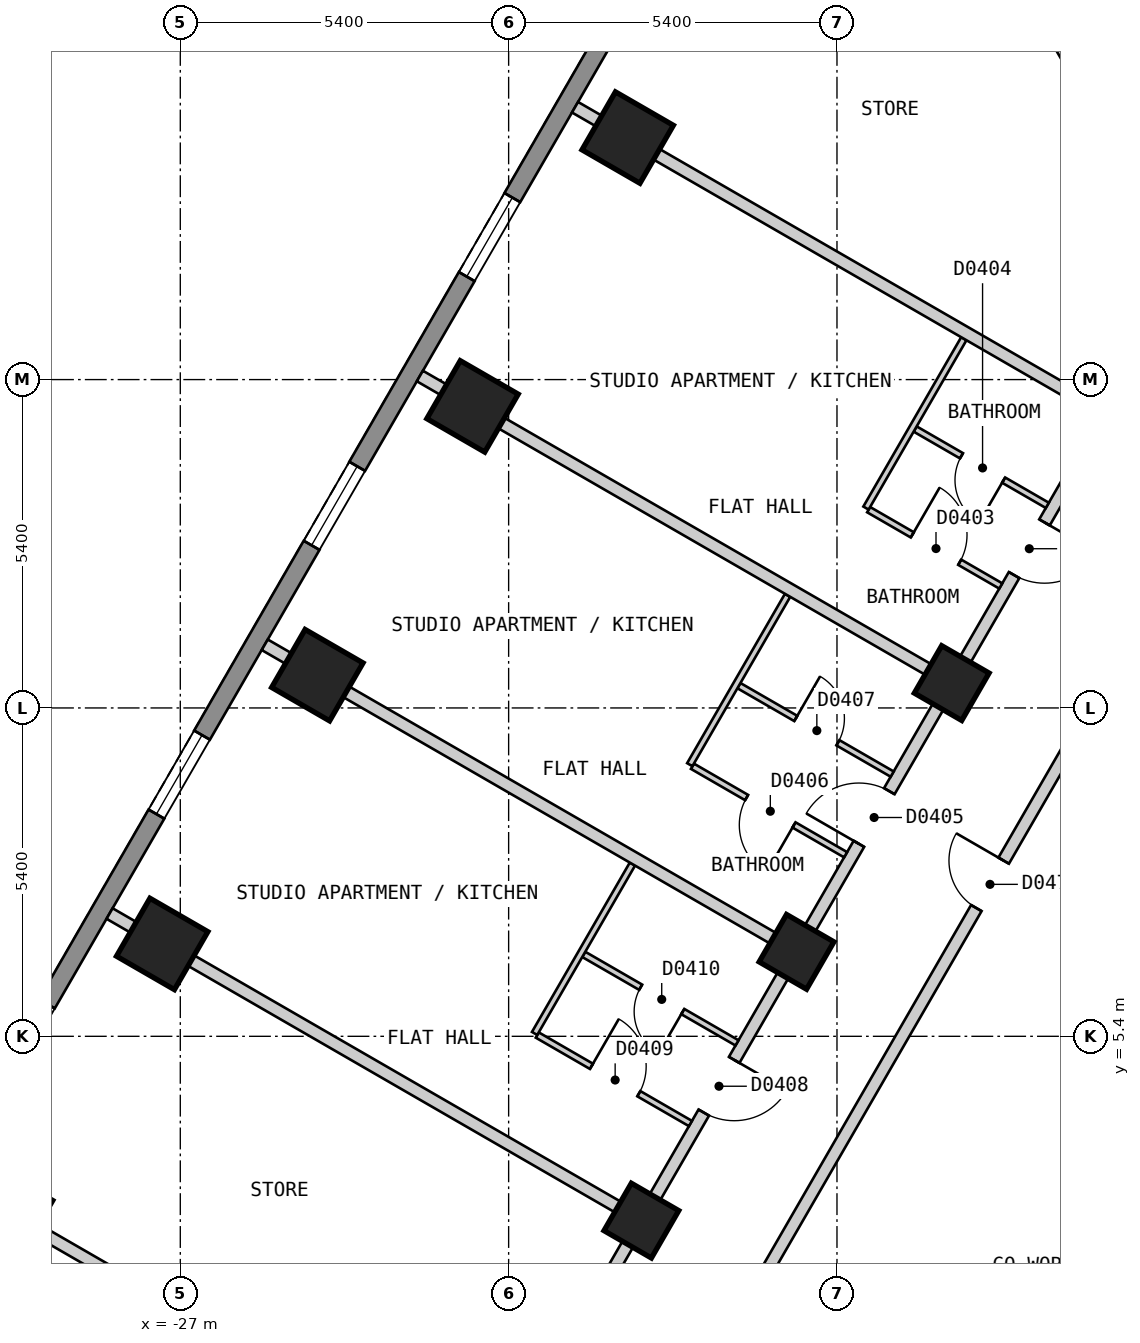
"""IFC4 building model, lengths in metres.
Left out: names, types, materials, properties, quantities, classifications, styles, units other than length and angle.
Written with IfcOpenShell. Run it as: python <this file> out.ifc"""

import sys

from ifc_helpers import new_model, si_unit, direction, frame, frame_2d, origin, origin_2d, place, context, subcontext, project, spatial, polyline, rectangle, outline, extrude, element, fill, save


model = new_model("IFC4")
c1 = context("Model", 3, precision=1e-05, world=origin(), true_north=direction((0.0, 1.0)))
c2 = subcontext(c1, "Body", "Model", "MODEL_VIEW")
j1 = project(units=[si_unit("LENGTHUNIT", "METRE"), si_unit("PLANEANGLEUNIT", "RADIAN")], contexts=[c1])
p1 = place(None, origin())
s1 = spatial("IfcSite", under=j1, at=p1, CompositionType="ELEMENT")
p2 = place(p1, origin())
s2 = spatial("IfcBuilding", under=s1, at=p2, CompositionType="ELEMENT")
p3 = place(p2, frame((0.0, 0.0, 26.4)))
s3 = spatial("IfcBuildingStorey", under=s2, at=p3, CompositionType="ELEMENT", Elevation=26.4)
for number, where, z_axis, x_axis in (
    (1, (-19.642, 20.18, 0.0), (0.0, 0.0, 1.0), (-0.5, -0.866, 0.0)),
    (2, (-22.194, 15.759, 0.0), (0.0, 0.0, 1.0), (-0.5, -0.866, 0.0)),
    (3, (-24.746, 11.339, 0.0), (0.0, 0.0, 1.0), (-0.5, -0.866, 0.0)),
    (4, (-27.298, 6.919, 0.0), (0.0, 0.0, 1.0), (-0.5, -0.866, 0.0)),
    (5, (-29.849, 2.499, 0.0), (0.0, 0.0, 1.0), (-0.5, -0.866, 0.0)),
):
    element("IfcColumn", number, at=place(p3, frame(where, z_axis=z_axis, x_axis=x_axis)), inside=s3, PredefinedType="COLUMN", context=c2, shape_type="SweptSolid", body=[
        extrude(rectangle(XDim=1.1, YDim=1.1, at=origin_2d()), origin(), (0.0, 0.0, 1.0), 3.0),
    ])
for number, where, z_axis, x_axis in (
    (6, (-14.313, 11.209, 0.0), (0.0, 0.0, 1.0), (-0.5, -0.866, 0.0)),
    (7, (-16.865, 6.789, 0.0), (0.0, 0.0, 1.0), (-0.5, -0.866, 0.0)),
    (8, (-19.417, 2.369, 0.0), (0.0, 0.0, 1.0), (-0.5, -0.866, 0.0)),
):
    element("IfcColumn", number, at=place(p3, frame(where, z_axis=z_axis, x_axis=x_axis)), inside=s3, PredefinedType="COLUMN", context=c2, shape_type="SweptSolid", body=[
        extrude(rectangle(XDim=0.9, YDim=0.9, at=origin_2d()), origin(), (0.0, 0.0, 1.0), 3.0),
    ])
p4 = place(p3, frame((-17.71, 25.825, 0.0), z_axis=(0.0, 0.0, 1.0), x_axis=(-0.500001938803, -0.866024284413, 0.0)))
e9 = element("IfcWall", 9, at=p4, inside=s3, PredefinedType="SOLIDWALL", context=c2, shape_type="SweptSolid", body=[
    extrude(outline(polyline([(0.0, -0.15), (27.02, -0.15), (26.94, 0.15), (0.08, 0.15), (0.0, -0.15)])), origin(), (0.0, 0.0, 1.0), 2.7),
])
p5 = place(p4, frame((2.553, 0.0, 0.15)))
e10 = element("IfcOpeningElement", 10, at=p5, cuts=e9, PredefinedType="OPENING", context=c2, shape_type="SweptSolid", body=[
    extrude(rectangle(XDim=1.5, YDim=2.1, at=frame_2d((0.75, 1.05))), frame((0.0, 0.16, 0.0), z_axis=(0.0, -1.0, 0.0), x_axis=(1.0, 0.0, 0.0)), (0.0, 0.0, 1.0), 0.32),
])
p6 = place(p4, frame((7.658, 0.0, 0.15)))
e11 = element("IfcOpeningElement", 11, at=p6, cuts=e9, PredefinedType="OPENING", context=c2, shape_type="SweptSolid", body=[
    extrude(rectangle(XDim=1.5, YDim=2.1, at=frame_2d((0.75, 1.05))), frame((0.0, 0.16, 0.0), z_axis=(0.0, -1.0, 0.0), x_axis=(1.0, 0.0, 0.0)), (0.0, 0.0, 1.0), 0.32),
])
p7 = place(p4, frame((12.761, 0.0, 0.15)))
e12 = element("IfcOpeningElement", 12, at=p7, cuts=e9, PredefinedType="OPENING", context=c2, shape_type="SweptSolid", body=[
    extrude(rectangle(XDim=1.5, YDim=2.1, at=frame_2d((0.75, 1.05))), frame((0.0, 0.16, 0.0), z_axis=(0.0, -1.0, 0.0), x_axis=(1.0, 0.0, 0.0)), (0.0, 0.0, 1.0), 0.32),
])
p8 = place(p4, frame((17.865, 0.0, 0.15)))
e13 = element("IfcOpeningElement", 13, at=p8, cuts=e9, PredefinedType="OPENING", context=c2, shape_type="SweptSolid", body=[
    extrude(rectangle(XDim=1.5, YDim=2.1, at=frame_2d((0.75, 1.05))), frame((0.0, 0.16, 0.0), z_axis=(0.0, -1.0, 0.0), x_axis=(1.0, 0.0, 0.0)), (0.0, 0.0, 1.0), 0.32),
])
p9 = place(p4, frame((22.969, 0.0, 0.15)))
e14 = element("IfcOpeningElement", 14, at=p9, cuts=e9, PredefinedType="OPENING", context=c2, shape_type="SweptSolid", body=[
    extrude(rectangle(XDim=1.5, YDim=2.1, at=frame_2d((0.75, 1.05))), frame((0.0, 0.16, 0.0), z_axis=(0.0, -1.0, 0.0), x_axis=(1.0, 0.0, 0.0)), (0.0, 0.0, 1.0), 0.32),
])
p10 = place(p3, frame((-18.244, -0.001, 0.0), z_axis=(0.0, 0.0, 1.0), x_axis=(0.499962999376, 0.866046765051, 0.0)))
e15 = element("IfcWall", 15, at=p10, inside=s3, PredefinedType="PARTITIONING", context=c2, shape_type="SweptSolid", body=[
    extrude(rectangle(XDim=18.245, YDim=0.2, at=frame_2d((9.123, 0.0))), origin(), (0.0, 0.0, 1.0), 2.7),
])
p11 = place(p10, frame((8.672, 0.0, 0.0)))
e16 = element("IfcOpeningElement", 16, at=p11, cuts=e15, PredefinedType="OPENING", context=c2, shape_type="SweptSolid", body=[
    extrude(rectangle(XDim=0.9, YDim=2.1, at=frame_2d((0.45, 1.05))), frame((0.0, 0.11, 0.0), z_axis=(0.0, -1.0, 0.0), x_axis=(1.0, 0.0, 0.0)), (0.0, 0.0, 1.0), 0.22),
])
p12 = place(p3, frame((-20.727, 0.099, 0.0), z_axis=(0.0, 0.0, 1.0), x_axis=(0.499993204491, 0.866029327138, 0.0)))
e17 = element("IfcWall", 17, at=p12, inside=s3, PredefinedType="PARTITIONING", context=c2, shape_type="SweptSolid", body=[
    extrude(rectangle(XDim=20.554, YDim=0.2, at=frame_2d((10.277, 0.0))), origin(), (0.0, 0.0, 1.0), 2.7),
])
p13 = place(p12, frame((18.916, 0.0, 0.0)))
e18 = element("IfcOpeningElement", 18, at=p13, cuts=e17, PredefinedType="OPENING", context=c2, shape_type="SweptSolid", body=[
    extrude(rectangle(XDim=0.8, YDim=2.1, at=frame_2d((0.4, 1.05))), frame((0.0, 0.11, 0.0), z_axis=(0.0, -1.0, 0.0), x_axis=(1.0, 0.0, 0.0)), (0.0, 0.0, 1.0), 0.22),
])
p14 = place(p12, frame((14.88, 0.0, 0.0)))
e19 = element("IfcOpeningElement", 19, at=p14, cuts=e17, PredefinedType="OPENING", context=c2, shape_type="SweptSolid", body=[
    extrude(rectangle(XDim=1.0, YDim=2.1, at=frame_2d((0.5, 1.05))), frame((0.0, 0.11, 0.0), z_axis=(0.0, -1.0, 0.0), x_axis=(1.0, 0.0, 0.0)), (0.0, 0.0, 1.0), 0.22),
])
p15 = place(p12, frame((9.776, 0.0, 0.0)))
e20 = element("IfcOpeningElement", 20, at=p15, cuts=e17, PredefinedType="OPENING", context=c2, shape_type="SweptSolid", body=[
    extrude(rectangle(XDim=1.0, YDim=2.1, at=frame_2d((0.5, 1.05))), frame((0.0, 0.11, 0.0), z_axis=(0.0, -1.0, 0.0), x_axis=(1.0, 0.0, 0.0)), (0.0, 0.0, 1.0), 0.22),
])
p16 = place(p12, frame((4.673, 0.0, 0.0)))
e21 = element("IfcOpeningElement", 21, at=p16, cuts=e17, PredefinedType="OPENING", context=c2, shape_type="SweptSolid", body=[
    extrude(rectangle(XDim=1.0, YDim=2.1, at=frame_2d((0.5, 1.05))), frame((0.0, 0.11, 0.0), z_axis=(0.0, -1.0, 0.0), x_axis=(1.0, 0.0, 0.0)), (0.0, 0.0, 1.0), 0.22),
])
p17 = place(p12, frame((0.838, 0.0, 0.0)))
e22 = element("IfcOpeningElement", 22, at=p17, cuts=e17, PredefinedType="OPENING", context=c2, shape_type="SweptSolid", body=[
    extrude(rectangle(XDim=0.8, YDim=2.1, at=frame_2d((0.4, 1.05))), frame((0.0, 0.11, 0.0), z_axis=(0.0, -1.0, 0.0), x_axis=(1.0, 0.0, 0.0)), (0.0, 0.0, 1.0), 0.22),
])
p18 = place(p3, frame((-20.364, 6.747, 0.0), z_axis=(0.0, 0.0, 1.0), x_axis=(0.866003949776, -0.500037157592, 0.0)))
e23 = element("IfcWall", 23, at=p18, inside=s3, PredefinedType="PARTITIONING", context=c2, shape_type="SweptSolid", body=[
    extrude(rectangle(XDim=2.91, YDim=0.1, at=frame_2d((1.455, 0.0))), origin(), (0.0, 0.0, 1.0), 2.7),
])
p19 = place(p18, frame((1.08, 0.0, 0.0)))
e24 = element("IfcOpeningElement", 24, at=p19, cuts=e23, PredefinedType="OPENING", context=c2, shape_type="SweptSolid", body=[
    extrude(rectangle(XDim=0.8, YDim=2.1, at=frame_2d((0.4, 1.05))), frame((0.0, 0.06, 0.0), z_axis=(0.0, -1.0, 0.0), x_axis=(1.0, 0.0, 0.0)), (0.0, 0.0, 1.0), 0.12),
])
p20 = place(p3, frame((-21.129, 5.421, 0.0), z_axis=(0.0, 0.0, 1.0), x_axis=(0.865935355752, -0.500155935342, 0.0)))
e25 = element("IfcWall", 25, at=p20, inside=s3, PredefinedType="PARTITIONING", context=c2, shape_type="SweptSolid", body=[
    extrude(rectangle(XDim=2.909, YDim=0.1, at=frame_2d((1.454, 0.0))), origin(), (0.0, 0.0, 1.0), 2.7),
])
p21 = place(p20, frame((1.029, 0.0, 0.0)))
e26 = element("IfcOpeningElement", 26, at=p21, cuts=e25, PredefinedType="OPENING", context=c2, shape_type="SweptSolid", body=[
    extrude(rectangle(XDim=0.9, YDim=2.1, at=frame_2d((0.45, 1.05))), frame((0.0, 0.06, 0.0), z_axis=(0.0, -1.0, 0.0), x_axis=(1.0, 0.0, 0.0)), (0.0, 0.0, 1.0), 0.12),
])
p22 = place(p3, frame((-18.577, 9.841, 0.0), z_axis=(0.0, 0.0, 1.0), x_axis=(0.865899003441, -0.500218867937, 0.0)))
e27 = element("IfcWall", 27, at=p22, inside=s3, PredefinedType="PARTITIONING", context=c2, shape_type="SweptSolid", body=[
    extrude(rectangle(XDim=2.909, YDim=0.1, at=frame_2d((1.455, 0.0))), origin(), (0.0, 0.0, 1.0), 2.7),
])
p23 = place(p22, frame((1.029, 0.0, 0.0)))
e28 = element("IfcOpeningElement", 28, at=p23, cuts=e27, PredefinedType="OPENING", context=c2, shape_type="SweptSolid", body=[
    extrude(rectangle(XDim=0.9, YDim=2.1, at=frame_2d((0.45, 1.05))), frame((0.0, 0.06, 0.0), z_axis=(0.0, -1.0, 0.0), x_axis=(1.0, 0.0, 0.0)), (0.0, 0.0, 1.0), 0.12),
])
p24 = place(p3, frame((-15.679, 14.061, 0.0), z_axis=(0.0, 0.0, 1.0), x_axis=(0.865916579361, -0.500188442078, 0.0)))
e29 = element("IfcWall", 29, at=p24, inside=s3, PredefinedType="PARTITIONING", context=c2, shape_type="SweptSolid", body=[
    extrude(rectangle(XDim=2.509, YDim=0.1, at=frame_2d((1.255, 0.0))), origin(), (0.0, 0.0, 1.0), 2.7),
])
p25 = place(p24, frame((0.829, 0.0, 0.0)))
e30 = element("IfcOpeningElement", 30, at=p25, cuts=e29, PredefinedType="OPENING", context=c2, shape_type="SweptSolid", body=[
    extrude(rectangle(XDim=0.9, YDim=2.1, at=frame_2d((0.45, 1.05))), frame((0.0, 0.06, 0.0), z_axis=(0.0, -1.0, 0.0), x_axis=(1.0, 0.0, 0.0)), (0.0, 0.0, 1.0), 0.12),
])
p26 = place(p3, frame((-14.914, 15.387, 0.0), z_axis=(0.0, 0.0, 1.0), x_axis=(0.865983051302, -0.500073349477, 0.0)))
e31 = element("IfcWall", 31, at=p26, inside=s3, PredefinedType="PARTITIONING", context=c2, shape_type="SweptSolid", body=[
    extrude(rectangle(XDim=2.509, YDim=0.1, at=frame_2d((1.255, 0.0))), origin(), (0.0, 0.0, 1.0), 2.7),
])
p27 = place(p26, frame((0.88, 0.0, 0.0)))
e32 = element("IfcOpeningElement", 32, at=p27, cuts=e31, PredefinedType="OPENING", context=c2, shape_type="SweptSolid", body=[
    extrude(rectangle(XDim=0.8, YDim=2.1, at=frame_2d((0.4, 1.05))), frame((0.0, 0.06, 0.0), z_axis=(0.0, -1.0, 0.0), x_axis=(1.0, 0.0, 0.0)), (0.0, 0.0, 1.0), 0.12),
])
p28 = place(p3, frame((-17.813, 11.167, 0.0), z_axis=(0.0, 0.0, 1.0), x_axis=(0.866087824531, -0.499891868507, 0.0)))
e33 = element("IfcWall", 33, at=p28, inside=s3, PredefinedType="PARTITIONING", context=c2, shape_type="SweptSolid", body=[
    extrude(rectangle(XDim=2.911, YDim=0.1, at=frame_2d((1.456, 0.0))), origin(), (0.0, 0.0, 1.0), 2.7),
])
p29 = place(p28, frame((1.08, 0.0, 0.0)))
e34 = element("IfcOpeningElement", 34, at=p29, cuts=e33, PredefinedType="OPENING", context=c2, shape_type="SweptSolid", body=[
    extrude(rectangle(XDim=0.8, YDim=2.1, at=frame_2d((0.4, 1.05))), frame((0.0, 0.06, 0.0), z_axis=(0.0, -1.0, 0.0), x_axis=(1.0, 0.0, 0.0)), (0.0, 0.0, 1.0), 0.12),
])
p30 = place(p3, frame((-15.723, 14.087, 0.0), z_axis=(0.0, 0.0, 1.0), x_axis=(0.500204249835, 0.865907447969, 0.0)))
e35 = element("IfcWall", 35, at=p30, inside=s3, PredefinedType="PARTITIONING", context=c2, shape_type="SweptSolid", body=[
    extrude(rectangle(XDim=3.217, YDim=0.1, at=frame_2d((1.608, 0.0))), origin(), (0.0, 0.0, 1.0), 2.7),
])
p31 = place(p3, frame((-21.173, 5.447, 0.0), z_axis=(0.0, 0.0, 1.0), x_axis=(0.500162542782, 0.865931539325, 0.0)))
e36 = element("IfcWall", 36, at=p31, inside=s3, PredefinedType="PARTITIONING", context=c2, shape_type="SweptSolid", body=[
    extrude(rectangle(XDim=3.217, YDim=0.1, at=frame_2d((1.609, 0.0))), origin(), (0.0, 0.0, 1.0), 2.7),
])
p32 = place(p3, frame((-18.621, 9.867, 0.0), z_axis=(0.0, 0.0, 1.0), x_axis=(0.500197891286, 0.865911121047, 0.0)))
e37 = element("IfcWall", 37, at=p32, inside=s3, PredefinedType="PARTITIONING", context=c2, shape_type="SweptSolid", body=[
    extrude(rectangle(XDim=3.215, YDim=0.1, at=frame_2d((1.607, 0.0))), origin(), (0.0, 0.0, 1.0), 2.7),
])
p33 = place(p3, frame((-12.659, 21.926, 0.0), z_axis=(0.0, 0.0, 1.0), x_axis=(0.500025458316, -0.86601070492, 0.0)))
e38 = element("IfcWall", 38, at=p33, inside=s3, PredefinedType="PARTITIONING", context=c2, shape_type="SweptSolid", body=[
    extrude(rectangle(XDim=4.533, YDim=0.2, at=frame_2d((2.267, 0.0))), origin(), (0.0, 0.0, 1.0), 2.7),
])
p34 = place(p3, frame((-28.163, 7.419, 0.0), z_axis=(0.0, 0.0, 1.0), x_axis=(0.866022959057, -0.500004234368, 0.0)))
e39 = element("IfcWall", 39, at=p34, inside=s3, PredefinedType="PARTITIONING", context=c2, shape_type="SweptSolid", body=[
    extrude(rectangle(XDim=10.0, YDim=0.2, at=frame_2d((5.0, 0.0))), origin(), (0.0, 0.0, 1.0), 2.7),
])
p35 = place(p3, frame((-30.716, 2.999, 0.0), z_axis=(0.0, 0.0, 1.0), x_axis=(0.866032775405, -0.499987231761, 0.0)))
e40 = element("IfcWall", 40, at=p35, inside=s3, PredefinedType="PARTITIONING", context=c2, shape_type="SweptSolid", body=[
    extrude(rectangle(XDim=5.8, YDim=0.2, at=frame_2d((2.9, 0.0))), origin(), (0.0, 0.0, 1.0), 2.7),
])
p36 = place(p3, frame((-25.611, 11.839, 0.0), z_axis=(0.0, 0.0, 1.0), x_axis=(0.866022959057, -0.500004234368, 0.0)))
e41 = element("IfcWall", 41, at=p36, inside=s3, PredefinedType="PARTITIONING", context=c2, shape_type="SweptSolid", body=[
    extrude(rectangle(XDim=10.0, YDim=0.2, at=frame_2d((5.0, 0.0))), origin(), (0.0, 0.0, 1.0), 2.7),
])
for number, where, z_axis, x_axis in (
    (42, (-20.508, 20.679, 0.0), (0.0, 0.0, 1.0), (0.866, -0.5, 0.0)),
    (43, (-23.06, 16.259, 0.0), (0.0, 0.0, 1.0), (0.866, -0.5, 0.0)),
):
    element("IfcWall", number, at=place(p3, frame(where, z_axis=z_axis, x_axis=x_axis)), inside=s3, PredefinedType="PARTITIONING", context=c2, shape_type="SweptSolid", body=[
        extrude(rectangle(XDim=10.001, YDim=0.2, at=frame_2d((5.0, 0.0))), origin(), (0.0, 0.0, 1.0), 2.7),
    ])
p37 = place(p6, origin())
e44 = element("IfcWindow", 44, at=p37, inside=s3, PartitioningType="SINGLE_PANEL", PredefinedType="WINDOW", context=c2, shape_type="SweptSolid", body=[
    extrude(rectangle(XDim=1.5, YDim=2.1, at=frame_2d((0.75, 1.05))), frame((0.0, 0.03, 0.0), z_axis=(0.0, -1.0, 0.0), x_axis=(1.0, 0.0, 0.0)), (0.0, 0.0, 1.0), 0.06),
])
fill(e11, e44)
p38 = place(p7, origin())
e45 = element("IfcWindow", 45, at=p38, inside=s3, PartitioningType="SINGLE_PANEL", PredefinedType="WINDOW", context=c2, shape_type="SweptSolid", body=[
    extrude(rectangle(XDim=1.5, YDim=2.1, at=frame_2d((0.75, 1.05))), frame((0.0, 0.03, 0.0), z_axis=(0.0, -1.0, 0.0), x_axis=(1.0, 0.0, 0.0)), (0.0, 0.0, 1.0), 0.06),
])
fill(e12, e45)
p39 = place(p8, origin())
e46 = element("IfcWindow", 46, at=p39, inside=s3, PartitioningType="SINGLE_PANEL", PredefinedType="WINDOW", context=c2, shape_type="SweptSolid", body=[
    extrude(rectangle(XDim=1.5, YDim=2.1, at=frame_2d((0.75, 1.05))), frame((0.0, 0.03, 0.0), z_axis=(0.0, -1.0, 0.0), x_axis=(1.0, 0.0, 0.0)), (0.0, 0.0, 1.0), 0.06),
])
fill(e13, e46)
p40 = place(p14, origin())
e47 = element("IfcDoor", 47, at=p40, inside=s3, OperationType="SINGLE_SWING_RIGHT", PredefinedType="DOOR", context=c2, shape_type="SweptSolid", body=[
    extrude(rectangle(XDim=1.0, YDim=2.1, at=frame_2d((0.5, 1.05))), frame((0.0, 0.025, 0.0), z_axis=(0.0, -1.0, 0.0), x_axis=(1.0, 0.0, 0.0)), (0.0, 0.0, 1.0), 0.05),
])
fill(e19, e47)
p41 = place(p25, origin())
e48 = element("IfcDoor", 48, at=p41, inside=s3, OperationType="SINGLE_SWING_LEFT", PredefinedType="DOOR", context=c2, shape_type="SweptSolid", body=[
    extrude(rectangle(XDim=0.9, YDim=2.1, at=frame_2d((0.45, 1.05))), frame((0.0, 0.025, 0.0), z_axis=(0.0, -1.0, 0.0), x_axis=(1.0, 0.0, 0.0)), (0.0, 0.0, 1.0), 0.05),
])
fill(e30, e48)
p42 = place(p27, origin())
e49 = element("IfcDoor", 49, at=p42, inside=s3, OperationType="SINGLE_SWING_RIGHT", PredefinedType="DOOR", context=c2, shape_type="SweptSolid", body=[
    extrude(rectangle(XDim=0.8, YDim=2.1, at=frame_2d((0.4, 1.05))), frame((0.0, 0.025, 0.0), z_axis=(0.0, -1.0, 0.0), x_axis=(1.0, 0.0, 0.0)), (0.0, 0.0, 1.0), 0.05),
])
fill(e32, e49)
p43 = place(p15, origin())
e50 = element("IfcDoor", 50, at=p43, inside=s3, OperationType="SINGLE_SWING_LEFT", PredefinedType="DOOR", context=c2, shape_type="SweptSolid", body=[
    extrude(rectangle(XDim=1.0, YDim=2.1, at=frame_2d((0.5, 1.05))), frame((0.0, 0.025, 0.0), z_axis=(0.0, -1.0, 0.0), x_axis=(1.0, 0.0, 0.0)), (0.0, 0.0, 1.0), 0.05),
])
fill(e20, e50)
p44 = place(p23, origin())
e51 = element("IfcDoor", 51, at=p44, inside=s3, OperationType="SINGLE_SWING_RIGHT", PredefinedType="DOOR", context=c2, shape_type="SweptSolid", body=[
    extrude(rectangle(XDim=0.9, YDim=2.1, at=frame_2d((0.45, 1.05))), frame((0.0, 0.025, 0.0), z_axis=(0.0, -1.0, 0.0), x_axis=(1.0, 0.0, 0.0)), (0.0, 0.0, 1.0), 0.05),
])
fill(e28, e51)
p45 = place(p29, origin())
e52 = element("IfcDoor", 52, at=p45, inside=s3, OperationType="SINGLE_SWING_LEFT", PredefinedType="DOOR", context=c2, shape_type="SweptSolid", body=[
    extrude(rectangle(XDim=0.8, YDim=2.1, at=frame_2d((0.4, 1.05))), frame((0.0, 0.025, 0.0), z_axis=(0.0, -1.0, 0.0), x_axis=(1.0, 0.0, 0.0)), (0.0, 0.0, 1.0), 0.05),
])
fill(e34, e52)
p46 = place(p16, origin())
e53 = element("IfcDoor", 53, at=p46, inside=s3, OperationType="SINGLE_SWING_RIGHT", PredefinedType="DOOR", context=c2, shape_type="SweptSolid", body=[
    extrude(rectangle(XDim=1.0, YDim=2.1, at=frame_2d((0.5, 1.05))), frame((0.0, 0.025, 0.0), z_axis=(0.0, -1.0, 0.0), x_axis=(1.0, 0.0, 0.0)), (0.0, 0.0, 1.0), 0.05),
])
fill(e21, e53)
p47 = place(p21, origin())
e54 = element("IfcDoor", 54, at=p47, inside=s3, OperationType="SINGLE_SWING_LEFT", PredefinedType="DOOR", context=c2, shape_type="SweptSolid", body=[
    extrude(rectangle(XDim=0.9, YDim=2.1, at=frame_2d((0.45, 1.05))), frame((0.0, 0.025, 0.0), z_axis=(0.0, -1.0, 0.0), x_axis=(1.0, 0.0, 0.0)), (0.0, 0.0, 1.0), 0.05),
])
fill(e26, e54)
p48 = place(p19, origin())
e55 = element("IfcDoor", 55, at=p48, inside=s3, OperationType="SINGLE_SWING_RIGHT", PredefinedType="DOOR", context=c2, shape_type="SweptSolid", body=[
    extrude(rectangle(XDim=0.8, YDim=2.1, at=frame_2d((0.4, 1.05))), frame((0.0, 0.025, 0.0), z_axis=(0.0, -1.0, 0.0), x_axis=(1.0, 0.0, 0.0)), (0.0, 0.0, 1.0), 0.05),
])
fill(e24, e55)
p49 = place(p11, origin())
e56 = element("IfcDoor", 56, at=p49, inside=s3, OperationType="SINGLE_SWING_RIGHT", PredefinedType="DOOR", context=c2, shape_type="SweptSolid", body=[
    extrude(rectangle(XDim=0.9, YDim=2.1, at=frame_2d((0.45, 1.05))), frame((0.0, 0.025, 0.0), z_axis=(0.0, -1.0, 0.0), x_axis=(1.0, 0.0, 0.0)), (0.0, 0.0, 1.0), 0.05),
])
fill(e16, e56)
save(model, sys.argv[1])
